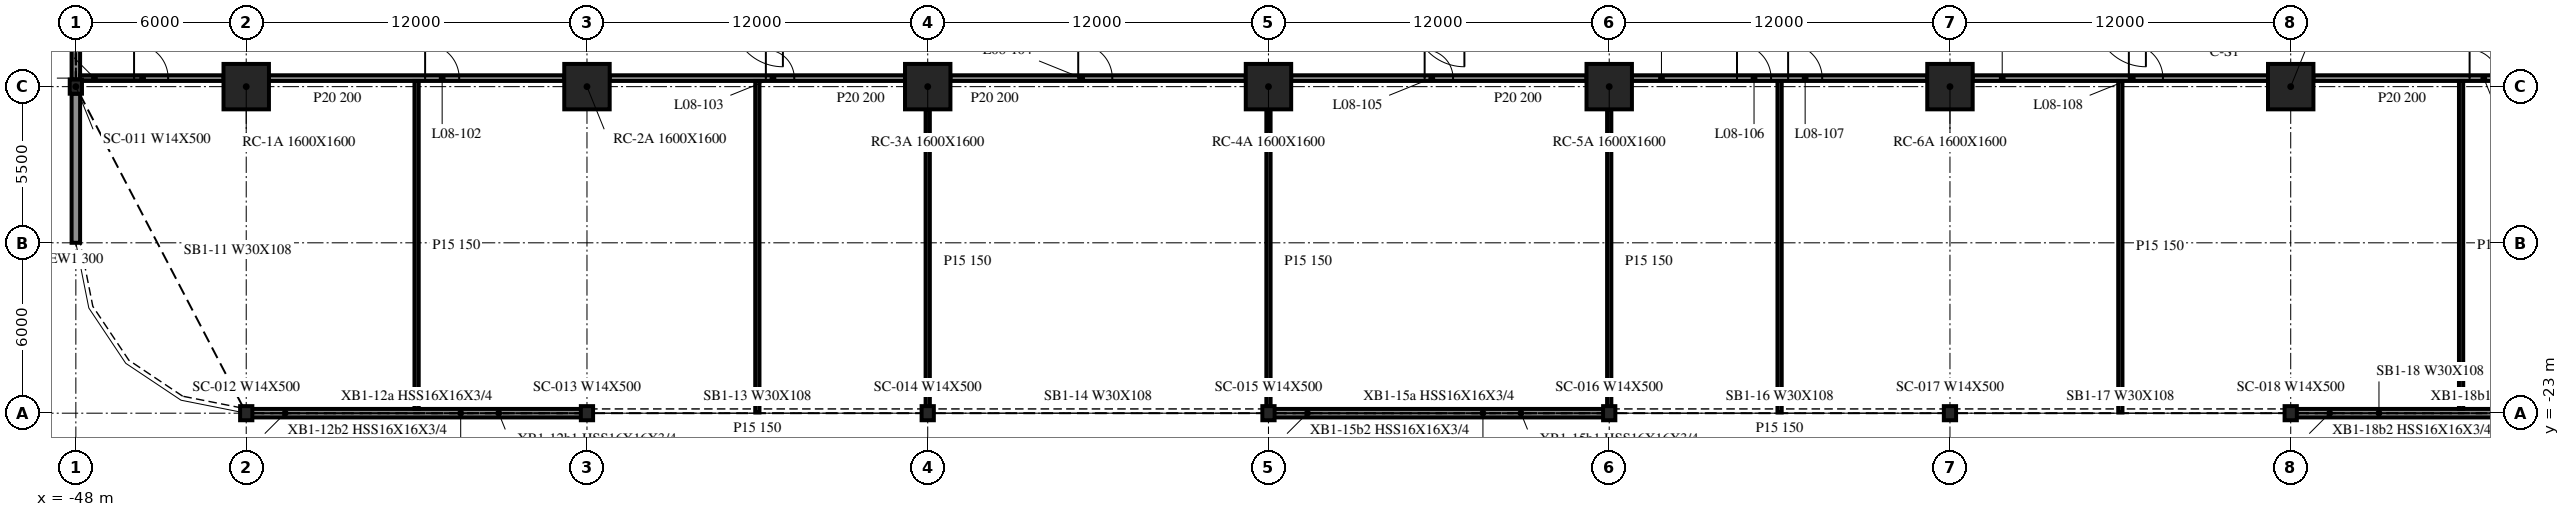
"""IFC4 building model, lengths in metres.
Left out: names, types, materials, properties, quantities, classifications, styles, units other than length and angle.
Written with IfcOpenShell. Run it as: python <this file> out.ifc"""

import sys

from ifc_helpers import new_model, si_unit, direction, frame, frame_2d, origin, origin_2d, place, context, subcontext, project, spatial, rectangle, i_section, extrude, element, fill, save


model = new_model("IFC4")
c1 = context("Model", 3, precision=1e-05, world=origin(), true_north=direction((0.0, 1.0)))
c2 = subcontext(c1, "Body", "Model", "MODEL_VIEW")
j1 = project(units=[si_unit("LENGTHUNIT", "METRE"), si_unit("PLANEANGLEUNIT", "RADIAN")], contexts=[c1])
p1 = place(None, origin())
s1 = spatial("IfcSite", under=j1, at=p1, CompositionType="ELEMENT")
p2 = place(p1, origin())
s2 = spatial("IfcBuilding", under=s1, at=p2, CompositionType="ELEMENT")
p3 = place(p2, frame((0.0, 0.0, 37.3)))
s3 = spatial("IfcBuildingStorey", under=s2, at=p3, CompositionType="ELEMENT", Elevation=37.3)
for number, where, z_axis, x_axis in (
    (1, (-42.0, -11.5, -0.34), (0.0, 0.0, 1.0), (1.0, 0.0, 0.0)),
    (2, (-30.0, -11.5, -0.34), (0.0, 0.0, 1.0), (1.0, 0.0, 0.0)),
    (3, (-18.0, -11.5, -0.34), (0.0, 0.0, 1.0), (1.0, 0.0, 0.0)),
    (4, (-6.0, -11.5, -0.34), (0.0, 0.0, 1.0), (1.0, 0.0, 0.0)),
    (5, (6.0, -11.5, -0.34), (0.0, 0.0, 1.0), (1.0, 0.0, 0.0)),
    (6, (18.0, -11.5, -0.34), (0.0, 0.0, 1.0), (1.0, 0.0, 0.0)),
    (7, (30.0, -11.5, -0.34), (0.0, 0.0, 1.0), (1.0, 0.0, 0.0)),
):
    element("IfcColumn", number, at=place(p3, frame(where, z_axis=z_axis, x_axis=x_axis)), inside=s3, PredefinedType="COLUMN", context=c2, shape_type="SweptSolid", body=[
        extrude(rectangle(XDim=1.6, YDim=1.6, at=origin_2d()), origin(), (0.0, 0.0, 1.0), 4.09),
    ])
for number, where, z_axis, x_axis in (
    (8, (-48.0, -11.5, -0.34), (0.0, 0.0, 1.0), (1.0, 0.0, 0.0)),
    (9, (-42.0, -23.0, -0.34), (0.0, 0.0, 1.0), (1.0, 0.0, 0.0)),
    (10, (-30.0, -23.0, -0.34), (0.0, 0.0, 1.0), (1.0, 0.0, 0.0)),
    (11, (-18.0, -23.0, -0.34), (0.0, 0.0, 1.0), (1.0, 0.0, 0.0)),
    (12, (-6.0, -23.0, -0.34), (0.0, 0.0, 1.0), (1.0, 0.0, 0.0)),
    (13, (6.0, -23.0, -0.34), (0.0, 0.0, 1.0), (1.0, 0.0, 0.0)),
    (14, (18.0, -23.0, -0.34), (0.0, 0.0, 1.0), (1.0, 0.0, 0.0)),
    (15, (30.0, -23.0, -0.34), (0.0, 0.0, 1.0), (1.0, 0.0, 0.0)),
):
    element("IfcColumn", number, at=place(p3, frame(where, z_axis=z_axis, x_axis=x_axis)), inside=s3, PredefinedType="COLUMN", context=c2, shape_type="SweptSolid", body=[
        extrude(i_section(OverallWidth=0.432, OverallDepth=0.498, WebThickness=0.056, FlangeThickness=0.089, at=origin_2d()), origin(), (0.0, 0.0, 1.0), 4.09),
    ])
p4 = place(p3, frame((-48.0, -0.249, 0.0), z_axis=(0.0, 0.0, 1.0), x_axis=(0.0, -1.0, 0.0)))
e16 = element("IfcWall", 16, at=p4, inside=s3, PredefinedType="NOTDEFINED", context=c2, shape_type="SweptSolid", body=[
    extrude(rectangle(XDim=11.002, YDim=0.3, at=frame_2d((5.501, 0.0))), origin(), (0.0, 0.0, 1.0), 3.75),
])
p5 = place(p3, frame((-48.0, -11.749, 0.0), z_axis=(0.0, 0.0, 1.0), x_axis=(0.0, -1.0, 0.0)))
e17 = element("IfcWall", 17, at=p5, inside=s3, PredefinedType="NOTDEFINED", context=c2, shape_type="SweptSolid", body=[
    extrude(rectangle(XDim=5.251, YDim=0.3, at=frame_2d((2.625, 0.0))), origin(), (0.0, 0.0, 1.0), 3.75),
])
for number, where, z_axis, x_axis in (
    (18, (-41.972, -23.0, 0.0), (0.0, 0.0, 1.0), (1.0, 0.0, 0.0)),
    (19, (-5.972, -23.0, 0.0), (0.0, 0.0, 1.0), (1.0, 0.0, 0.0)),
    (20, (30.028, -23.0, 0.0), (0.0, 0.0, 1.0), (1.0, 0.0, 0.0)),
):
    element("IfcWall", number, at=place(p3, frame(where, z_axis=z_axis, x_axis=x_axis)), inside=s3, PredefinedType="NOTDEFINED", context=c2, shape_type="SweptSolid", body=[
        extrude(rectangle(XDim=11.944, YDim=0.3, at=frame_2d((5.972, 0.0))), origin(), (0.0, 0.0, 1.0), 3.75),
    ])
p6 = place(p3, frame((-47.85, -11.2, 0.0), z_axis=(0.0, 0.0, 1.0), x_axis=(1.0, 0.0, 0.0)))
e21 = element("IfcWall", 21, at=p6, inside=s3, PredefinedType="PARTITIONING", context=c2, shape_type="SweptSolid", body=[
    extrude(rectangle(XDim=5.05, YDim=0.2, at=frame_2d((2.525, 0.0))), origin(), (0.0, 0.0, 1.0), 3.75),
])
p7 = place(p6, frame((1.9, 0.0, 0.0)))
e22 = element("IfcOpeningElement", 22, at=p7, cuts=e21, PredefinedType="OPENING", context=c2, shape_type="SweptSolid", body=[
    extrude(rectangle(XDim=1.2, YDim=2.1, at=frame_2d((0.6, 1.05))), frame((0.0, 0.11, 0.0), z_axis=(0.0, -1.0, 0.0), x_axis=(1.0, 0.0, 0.0)), (0.0, 0.0, 1.0), 0.22),
])
p8 = place(p3, frame((-41.2, -11.2, 0.0), z_axis=(0.0, 0.0, 1.0), x_axis=(1.0, 0.0, 0.0)))
e23 = element("IfcWall", 23, at=p8, inside=s3, PredefinedType="PARTITIONING", context=c2, shape_type="SweptSolid", body=[
    extrude(rectangle(XDim=10.4, YDim=0.2, at=frame_2d((5.2, 0.0))), origin(), (0.0, 0.0, 1.0), 3.75),
])
p9 = place(p8, frame((5.5, 0.0, 0.0)))
e24 = element("IfcOpeningElement", 24, at=p9, cuts=e23, PredefinedType="OPENING", context=c2, shape_type="SweptSolid", body=[
    extrude(rectangle(XDim=1.2, YDim=2.1, at=frame_2d((0.6, 1.05))), frame((0.0, 0.11, 0.0), z_axis=(0.0, -1.0, 0.0), x_axis=(1.0, 0.0, 0.0)), (0.0, 0.0, 1.0), 0.22),
])
p10 = place(p3, frame((-29.2, -11.2, 0.0), z_axis=(0.0, 0.0, 1.0), x_axis=(1.0, 0.0, 0.0)))
e25 = element("IfcWall", 25, at=p10, inside=s3, PredefinedType="PARTITIONING", context=c2, shape_type="SweptSolid", body=[
    extrude(rectangle(XDim=10.4, YDim=0.2, at=frame_2d((5.2, 0.0))), origin(), (0.0, 0.0, 1.0), 3.75),
])
p11 = place(p10, frame((5.5, 0.0, 0.0)))
e26 = element("IfcOpeningElement", 26, at=p11, cuts=e25, PredefinedType="OPENING", context=c2, shape_type="SweptSolid", body=[
    extrude(rectangle(XDim=1.0, YDim=2.1, at=frame_2d((0.5, 1.05))), frame((0.0, 0.11, 0.0), z_axis=(0.0, -1.0, 0.0), x_axis=(1.0, 0.0, 0.0)), (0.0, 0.0, 1.0), 0.22),
])
p12 = place(p3, frame((-17.2, -11.2, 0.0), z_axis=(0.0, 0.0, 1.0), x_axis=(1.0, 0.0, 0.0)))
e27 = element("IfcWall", 27, at=p12, inside=s3, PredefinedType="PARTITIONING", context=c2, shape_type="SweptSolid", body=[
    extrude(rectangle(XDim=10.4, YDim=0.2, at=frame_2d((5.2, 0.0))), origin(), (0.0, 0.0, 1.0), 3.75),
])
p13 = place(p12, frame((4.5, 0.0, 0.0)))
e28 = element("IfcOpeningElement", 28, at=p13, cuts=e27, PredefinedType="OPENING", context=c2, shape_type="SweptSolid", body=[
    extrude(rectangle(XDim=1.2, YDim=2.1, at=frame_2d((0.6, 1.05))), frame((0.0, 0.11, 0.0), z_axis=(0.0, -1.0, 0.0), x_axis=(1.0, 0.0, 0.0)), (0.0, 0.0, 1.0), 0.22),
])
p14 = place(p3, frame((-5.2, -11.2, 0.0), z_axis=(0.0, 0.0, 1.0), x_axis=(1.0, 0.0, 0.0)))
e29 = element("IfcWall", 29, at=p14, inside=s3, PredefinedType="PARTITIONING", context=c2, shape_type="SweptSolid", body=[
    extrude(rectangle(XDim=10.4, YDim=0.2, at=frame_2d((5.2, 0.0))), origin(), (0.0, 0.0, 1.0), 3.75),
])
p15 = place(p14, frame((4.7, 0.0, 0.0)))
e30 = element("IfcOpeningElement", 30, at=p15, cuts=e29, PredefinedType="OPENING", context=c2, shape_type="SweptSolid", body=[
    extrude(rectangle(XDim=1.0, YDim=2.1, at=frame_2d((0.5, 1.05))), frame((0.0, 0.11, 0.0), z_axis=(0.0, -1.0, 0.0), x_axis=(1.0, 0.0, 0.0)), (0.0, 0.0, 1.0), 0.22),
])
p16 = place(p3, frame((6.8, -11.2, 0.0), z_axis=(0.0, 0.0, 1.0), x_axis=(1.0, 0.0, 0.0)))
e31 = element("IfcWall", 31, at=p16, inside=s3, PredefinedType="PARTITIONING", context=c2, shape_type="SweptSolid", body=[
    extrude(rectangle(XDim=10.4, YDim=0.2, at=frame_2d((5.2, 0.0))), origin(), (0.0, 0.0, 1.0), 3.75),
])
p17 = place(p16, frame((3.7, 0.0, 0.0)))
e32 = element("IfcOpeningElement", 32, at=p17, cuts=e31, PredefinedType="OPENING", context=c2, shape_type="SweptSolid", body=[
    extrude(rectangle(XDim=1.2, YDim=2.1, at=frame_2d((0.6, 1.05))), frame((0.0, 0.11, 0.0), z_axis=(0.0, -1.0, 0.0), x_axis=(1.0, 0.0, 0.0)), (0.0, 0.0, 1.0), 0.22),
])
p18 = place(p16, frame((5.5, 0.0, 0.0)))
e33 = element("IfcOpeningElement", 33, at=p18, cuts=e31, PredefinedType="OPENING", context=c2, shape_type="SweptSolid", body=[
    extrude(rectangle(XDim=1.2, YDim=2.1, at=frame_2d((0.6, 1.05))), frame((0.0, 0.11, 0.0), z_axis=(0.0, -1.0, 0.0), x_axis=(1.0, 0.0, 0.0)), (0.0, 0.0, 1.0), 0.22),
])
p19 = place(p3, frame((18.8, -11.2, 0.0), z_axis=(0.0, 0.0, 1.0), x_axis=(1.0, 0.0, 0.0)))
e34 = element("IfcWall", 34, at=p19, inside=s3, PredefinedType="PARTITIONING", context=c2, shape_type="SweptSolid", body=[
    extrude(rectangle(XDim=10.4, YDim=0.2, at=frame_2d((5.2, 0.0))), origin(), (0.0, 0.0, 1.0), 3.75),
])
p20 = place(p19, frame((5.5, 0.0, 0.0)))
e35 = element("IfcOpeningElement", 35, at=p20, cuts=e34, PredefinedType="OPENING", context=c2, shape_type="SweptSolid", body=[
    extrude(rectangle(XDim=1.2, YDim=2.1, at=frame_2d((0.6, 1.05))), frame((0.0, 0.11, 0.0), z_axis=(0.0, -1.0, 0.0), x_axis=(1.0, 0.0, 0.0)), (0.0, 0.0, 1.0), 0.22),
])
p21 = place(p3, frame((30.8, -11.2, 0.0), z_axis=(0.0, 0.0, 1.0), x_axis=(1.0, 0.0, 0.0)))
e36 = element("IfcWall", 36, at=p21, inside=s3, PredefinedType="PARTITIONING", context=c2, shape_type="SweptSolid", body=[
    extrude(rectangle(XDim=10.4, YDim=0.2, at=frame_2d((5.2, 0.0))), origin(), (0.0, 0.0, 1.0), 2.751),
])
p22 = place(p21, frame((5.5, 0.0, 0.0)))
e37 = element("IfcOpeningElement", 37, at=p22, cuts=e36, PredefinedType="OPENING", context=c2, shape_type="SweptSolid", body=[
    extrude(rectangle(XDim=1.0, YDim=2.1, at=frame_2d((0.5, 1.05))), frame((0.0, 0.11, 0.0), z_axis=(0.0, -1.0, 0.0), x_axis=(1.0, 0.0, 0.0)), (0.0, 0.0, 1.0), 0.22),
])
p23 = place(p3, frame((-36.0, -22.85, 0.0), z_axis=(0.0, 0.0, 1.0), x_axis=(0.0, 1.0, 0.0)))
e38 = element("IfcWall", 38, at=p23, inside=s3, PredefinedType="PARTITIONING", context=c2, shape_type="SweptSolid", body=[
    extrude(rectangle(XDim=11.55, YDim=0.15, at=frame_2d((5.775, 0.0))), origin(), (0.0, 0.0, 1.0), 3.75),
])
p24 = place(p3, frame((-24.0, -22.975, 0.0), z_axis=(0.0, 0.0, 1.0), x_axis=(0.0, 1.0, 0.0)))
e39 = element("IfcWall", 39, at=p24, inside=s3, PredefinedType="PARTITIONING", context=c2, shape_type="SweptSolid", body=[
    extrude(rectangle(XDim=11.675, YDim=0.15, at=frame_2d((5.837, 0.0))), origin(), (0.0, 0.0, 1.0), 3.75),
])
for number, where, z_axis, x_axis in (
    (40, (-18.0, -22.975, 0.0), (0.0, 0.0, 1.0), (0.0, 1.0, 0.0)),
    (41, (-6.0, -22.975, 0.0), (0.0, 0.0, 1.0), (0.0, 1.0, 0.0)),
    (42, (6.0, -22.975, 0.0), (0.0, 0.0, 1.0), (0.0, 1.0, 0.0)),
):
    element("IfcWall", number, at=place(p3, frame(where, z_axis=z_axis, x_axis=x_axis)), inside=s3, PredefinedType="PARTITIONING", context=c2, shape_type="SweptSolid", body=[
        extrude(rectangle(XDim=10.675, YDim=0.15, at=frame_2d((5.337, 0.0))), origin(), (0.0, 0.0, 1.0), 3.75),
    ])
for number, where, z_axis, x_axis in (
    (43, (12.0, -22.975, 0.0), (0.0, 0.0, 1.0), (0.0, 1.0, 0.0)),
    (44, (24.0, -22.975, 0.0), (0.0, 0.0, 1.0), (0.0, 1.0, 0.0)),
):
    element("IfcWall", number, at=place(p3, frame(where, z_axis=z_axis, x_axis=x_axis)), inside=s3, PredefinedType="PARTITIONING", context=c2, shape_type="SweptSolid", body=[
        extrude(rectangle(XDim=11.675, YDim=0.15, at=frame_2d((5.837, 0.0))), origin(), (0.0, 0.0, 1.0), 3.75),
    ])
p25 = place(p3, frame((36.0, -22.85, 0.0), z_axis=(0.0, 0.0, 1.0), x_axis=(0.0, 1.0, 0.0)))
e45 = element("IfcWall", 45, at=p25, inside=s3, PredefinedType="PARTITIONING", context=c2, shape_type="SweptSolid", body=[
    extrude(rectangle(XDim=11.55, YDim=0.15, at=frame_2d((5.775, 0.0))), origin(), (0.0, 0.0, 1.0), 3.75),
])
p26 = place(p7, origin())
e46 = element("IfcDoor", 46, at=p26, inside=s3, OperationType="SINGLE_SWING_RIGHT", PredefinedType="DOOR", context=c2, shape_type="SweptSolid", body=[
    extrude(rectangle(XDim=1.2, YDim=2.1, at=frame_2d((0.6, 1.05))), frame((0.0, 0.025, 0.0), z_axis=(0.0, -1.0, 0.0), x_axis=(1.0, 0.0, 0.0)), (0.0, 0.0, 1.0), 0.05),
])
fill(e22, e46)
p27 = place(p9, origin())
e47 = element("IfcDoor", 47, at=p27, inside=s3, OperationType="SINGLE_SWING_LEFT", PredefinedType="DOOR", context=c2, shape_type="SweptSolid", body=[
    extrude(rectangle(XDim=1.2, YDim=2.1, at=frame_2d((0.6, 1.05))), frame((0.0, 0.025, 0.0), z_axis=(0.0, -1.0, 0.0), x_axis=(1.0, 0.0, 0.0)), (0.0, 0.0, 1.0), 0.05),
])
fill(e24, e47)
p28 = place(p11, origin())
e48 = element("IfcDoor", 48, at=p28, inside=s3, OperationType="SINGLE_SWING_LEFT", PredefinedType="DOOR", context=c2, shape_type="SweptSolid", body=[
    extrude(rectangle(XDim=1.0, YDim=2.1, at=frame_2d((0.5, 1.05))), frame((0.0, 0.025, 0.0), z_axis=(0.0, -1.0, 0.0), x_axis=(1.0, 0.0, 0.0)), (0.0, 0.0, 1.0), 0.05),
])
fill(e26, e48)
p29 = place(p13, origin())
e49 = element("IfcDoor", 49, at=p29, inside=s3, OperationType="SINGLE_SWING_RIGHT", PredefinedType="DOOR", context=c2, shape_type="SweptSolid", body=[
    extrude(rectangle(XDim=1.2, YDim=2.1, at=frame_2d((0.6, 1.05))), frame((0.0, 0.025, 0.0), z_axis=(0.0, -1.0, 0.0), x_axis=(1.0, 0.0, 0.0)), (0.0, 0.0, 1.0), 0.05),
])
fill(e28, e49)
p30 = place(p15, origin())
e50 = element("IfcDoor", 50, at=p30, inside=s3, OperationType="SINGLE_SWING_RIGHT", PredefinedType="DOOR", context=c2, shape_type="SweptSolid", body=[
    extrude(rectangle(XDim=1.0, YDim=2.1, at=frame_2d((0.5, 1.05))), frame((0.0, 0.025, 0.0), z_axis=(0.0, -1.0, 0.0), x_axis=(1.0, 0.0, 0.0)), (0.0, 0.0, 1.0), 0.05),
])
fill(e30, e50)
p31 = place(p17, origin())
e51 = element("IfcDoor", 51, at=p31, inside=s3, OperationType="SINGLE_SWING_RIGHT", PredefinedType="DOOR", context=c2, shape_type="SweptSolid", body=[
    extrude(rectangle(XDim=1.2, YDim=2.1, at=frame_2d((0.6, 1.05))), frame((0.0, 0.025, 0.0), z_axis=(0.0, -1.0, 0.0), x_axis=(1.0, 0.0, 0.0)), (0.0, 0.0, 1.0), 0.05),
])
fill(e32, e51)
p32 = place(p18, origin())
e52 = element("IfcDoor", 52, at=p32, inside=s3, OperationType="SINGLE_SWING_LEFT", PredefinedType="DOOR", context=c2, shape_type="SweptSolid", body=[
    extrude(rectangle(XDim=1.2, YDim=2.1, at=frame_2d((0.6, 1.05))), frame((0.0, 0.025, 0.0), z_axis=(0.0, -1.0, 0.0), x_axis=(1.0, 0.0, 0.0)), (0.0, 0.0, 1.0), 0.05),
])
fill(e33, e52)
p33 = place(p20, origin())
e53 = element("IfcDoor", 53, at=p33, inside=s3, OperationType="SINGLE_SWING_LEFT", PredefinedType="DOOR", context=c2, shape_type="SweptSolid", body=[
    extrude(rectangle(XDim=1.2, YDim=2.1, at=frame_2d((0.6, 1.05))), frame((0.0, 0.025, 0.0), z_axis=(0.0, -1.0, 0.0), x_axis=(1.0, 0.0, 0.0)), (0.0, 0.0, 1.0), 0.05),
])
fill(e35, e53)
p34 = place(p22, origin())
e54 = element("IfcDoor", 54, at=p34, inside=s3, OperationType="SINGLE_SWING_LEFT", PredefinedType="DOOR", context=c2, shape_type="SweptSolid", body=[
    extrude(rectangle(XDim=1.0, YDim=2.1, at=frame_2d((0.5, 1.05))), frame((0.0, 0.025, 0.0), z_axis=(0.0, -1.0, 0.0), x_axis=(1.0, 0.0, 0.0)), (0.0, 0.0, 1.0), 0.05),
])
fill(e37, e54)
save(model, sys.argv[1])
